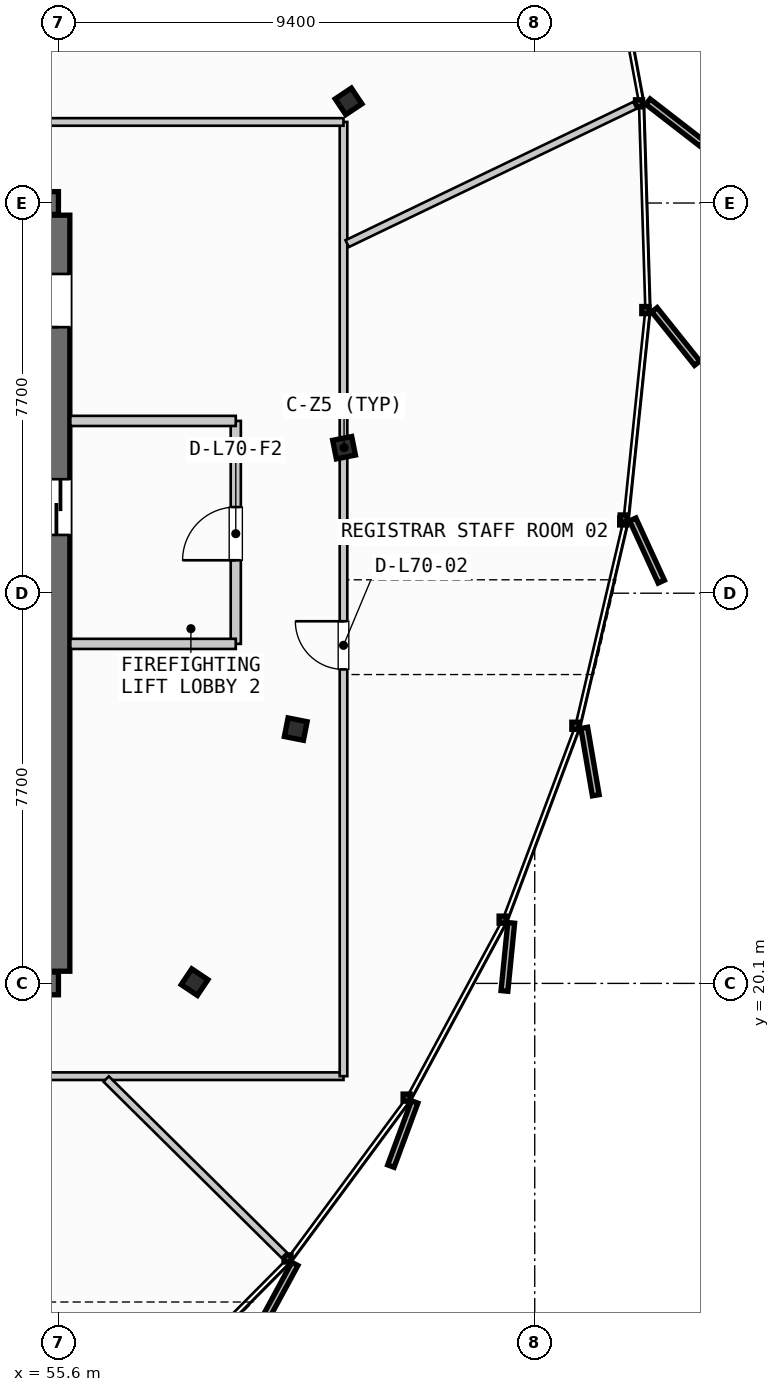
"""IFC4 building model, lengths in metres.
Left out: names, types, materials, properties, quantities, classifications, styles, units other than length and angle.
Written with IfcOpenShell. Run it as: python <this file> out.ifc"""

import sys

from ifc_helpers import new_model, si_unit, direction, frame, frame_2d, origin, origin_2d, place, context, subcontext, project, spatial, rectangle, i_section, extrude, source, transform, mapped, element, fill, save


model = new_model("IFC4")
c1 = context("Model", 3, precision=1e-05, world=origin(), true_north=direction((0.0, 1.0)))
c2 = subcontext(c1, "Body", "Model", "MODEL_VIEW")
j1 = project(units=[si_unit("LENGTHUNIT", "METRE"), si_unit("PLANEANGLEUNIT", "RADIAN")], contexts=[c1])
p1 = place(None, origin())
s1 = spatial("IfcSite", under=j1, at=p1, CompositionType="ELEMENT")
p2 = place(p1, origin())
s2 = spatial("IfcBuilding", under=s1, at=p2, CompositionType="ELEMENT")
p3 = place(p2, frame((0.0, 0.0, 266.35)))
s3 = spatial("IfcBuildingStorey", under=s2, at=p3, CompositionType="ELEMENT", Elevation=266.35)
p4 = place(p3, frame((38.0, 20.1, 0.0), z_axis=(0.0, 0.0, 1.0), x_axis=(1.0, 0.0, 0.0)))
e1 = element("IfcWall", 1, at=p4, inside=s3, PredefinedType="SHEAR", context=c2, shape_type="SweptSolid", body=[
    extrude(rectangle(XDim=17.6, YDim=0.45, at=frame_2d((8.8, 0.0))), origin(), (0.0, 0.0, 1.0), 3.21),
])
p5 = place(p4, frame((1.4, 0.0, 0.0)))
e2 = element("IfcOpeningElement", 2, at=p5, cuts=e1, PredefinedType="OPENING", context=c2, shape_type="SweptSolid", body=[
    extrude(rectangle(XDim=1.05, YDim=2.15, at=frame_2d((0.525, 1.075))), frame((0.0, 0.235, 0.0), z_axis=(0.0, -1.0, 0.0), x_axis=(1.0, 0.0, 0.0)), (0.0, 0.0, 1.0), 0.47),
])
p6 = place(p4, frame((15.15, 0.0, 0.0)))
e3 = element("IfcOpeningElement", 3, at=p6, cuts=e1, PredefinedType="OPENING", context=c2, shape_type="SweptSolid", body=[
    extrude(rectangle(XDim=1.05, YDim=2.15, at=frame_2d((0.525, 1.075))), frame((0.0, 0.235, 0.0), z_axis=(0.0, -1.0, 0.0), x_axis=(1.0, 0.0, 0.0)), (0.0, 0.0, 1.0), 0.47),
])
p7 = place(p4, frame((5.25, 0.0, 0.0)))
e4 = element("IfcOpeningElement", 4, at=p7, cuts=e1, PredefinedType="OPENING", context=c2, shape_type="SweptSolid", body=[
    extrude(rectangle(XDim=0.95, YDim=2.15, at=frame_2d((0.475, 1.075))), frame((0.0, 0.235, 0.0), z_axis=(0.0, -1.0, 0.0), x_axis=(1.0, 0.0, 0.0)), (0.0, 0.0, 1.0), 0.47),
])
p8 = place(p4, frame((11.4, 0.0, 0.0)))
e5 = element("IfcOpeningElement", 5, at=p8, cuts=e1, PredefinedType="OPENING", context=c2, shape_type="SweptSolid", body=[
    extrude(rectangle(XDim=0.95, YDim=2.15, at=frame_2d((0.475, 1.075))), frame((0.0, 0.235, 0.0), z_axis=(0.0, -1.0, 0.0), x_axis=(1.0, 0.0, 0.0)), (0.0, 0.0, 1.0), 0.47),
])
p9 = place(p3, frame((55.6, 35.5, 0.0), z_axis=(0.0, 0.0, 1.0), x_axis=(-1.0, 0.0, 0.0)))
e6 = element("IfcWall", 6, at=p9, inside=s3, PredefinedType="SHEAR", context=c2, shape_type="SweptSolid", body=[
    extrude(rectangle(XDim=17.6, YDim=0.45, at=frame_2d((8.8, 0.0))), origin(), (0.0, 0.0, 1.0), 3.21),
])
p10 = place(p9, frame((8.05, 0.0, 0.0)))
e7 = element("IfcOpeningElement", 7, at=p10, cuts=e6, PredefinedType="OPENING", context=c2, shape_type="SweptSolid", body=[
    extrude(rectangle(XDim=1.5, YDim=2.2, at=frame_2d((0.75, 1.1))), frame((0.0, 0.235, 0.0), z_axis=(0.0, -1.0, 0.0), x_axis=(1.0, 0.0, 0.0)), (0.0, 0.0, 1.0), 0.47),
])
p11 = place(p9, frame((15.1, 0.0, 0.0)))
e8 = element("IfcOpeningElement", 8, at=p11, cuts=e6, PredefinedType="OPENING", context=c2, shape_type="SweptSolid", body=[
    extrude(rectangle(XDim=0.95, YDim=2.15, at=frame_2d((0.475, 1.075))), frame((0.0, 0.235, 0.0), z_axis=(0.0, -1.0, 0.0), x_axis=(1.0, 0.0, 0.0)), (0.0, 0.0, 1.0), 0.47),
])
p12 = place(p9, frame((12.6, 0.0, 0.0)))
e9 = element("IfcOpeningElement", 9, at=p12, cuts=e6, PredefinedType="OPENING", context=c2, shape_type="SweptSolid", body=[
    extrude(rectangle(XDim=0.95, YDim=2.15, at=frame_2d((0.475, 1.075))), frame((0.0, 0.235, 0.0), z_axis=(0.0, -1.0, 0.0), x_axis=(1.0, 0.0, 0.0)), (0.0, 0.0, 1.0), 0.47),
])
p13 = place(p9, frame((10.45, 0.0, 0.0)))
e10 = element("IfcOpeningElement", 10, at=p13, cuts=e6, PredefinedType="OPENING", context=c2, shape_type="SweptSolid", body=[
    extrude(rectangle(XDim=0.95, YDim=2.15, at=frame_2d((0.475, 1.075))), frame((0.0, 0.235, 0.0), z_axis=(0.0, -1.0, 0.0), x_axis=(1.0, 0.0, 0.0)), (0.0, 0.0, 1.0), 0.47),
])
p14 = place(p3, frame((55.6, 20.34, 0.0), z_axis=(0.0, 0.0, 1.0), x_axis=(0.0, 1.0, 0.0)))
e11 = element("IfcWall", 11, at=p14, inside=s3, PredefinedType="SHEAR", context=c2, shape_type="SweptSolid", body=[
    extrude(rectangle(XDim=14.92, YDim=0.45, at=frame_2d((7.46, 0.0))), origin(), (0.0, 0.0, 1.0), 3.21),
])
p15 = place(p14, frame((12.71, 0.0, 0.0)))
e12 = element("IfcOpeningElement", 12, at=p15, cuts=e11, PredefinedType="OPENING", context=c2, shape_type="SweptSolid", body=[
    extrude(rectangle(XDim=1.05, YDim=2.15, at=frame_2d((0.525, 1.075))), frame((0.0, 0.235, 0.0), z_axis=(0.0, -1.0, 0.0), x_axis=(1.0, 0.0, 0.0)), (0.0, 0.0, 1.0), 0.47),
])
p16 = place(p14, frame((8.61, 0.0, 0.0)))
e13 = element("IfcOpeningElement", 13, at=p16, cuts=e11, PredefinedType="OPENING", context=c2, shape_type="SweptSolid", body=[
    extrude(rectangle(XDim=1.1, YDim=2.2, at=frame_2d((0.55, 1.1))), frame((0.0, 0.235, 0.0), z_axis=(0.0, -1.0, 0.0), x_axis=(1.0, 0.0, 0.0)), (0.0, 0.0, 1.0), 0.47),
])
m1 = source(origin(), c2, "Body", "SweptSolid", [
    extrude(i_section(OverallWidth=0.374, OverallDepth=0.383, WebThickness=0.017, FlangeThickness=0.026, FilletRadius=0.015, at=origin_2d()), origin(), (0.0, 0.0, 1.0), 3.21),
])
for number, where, z_axis, x_axis in (
    (14, (61.237, 30.672, 0.0), (0.0, 0.0, 1.0), (0.981, 0.195, 0.0)),
    (15, (61.326, 37.506, 0.0), (0.0, 0.0, 1.0), (0.831, 0.556, 0.0)),
    (16, (58.287, 20.125, 0.0), (0.0, 0.0, 1.0), (0.831, -0.556, 0.0)),
    (17, (60.284, 25.118, 0.0), (0.0, 0.0, 1.0), (0.981, -0.195, 0.0)),
):
    element("IfcColumn", number, at=place(p3, frame(where, z_axis=z_axis, x_axis=x_axis)), inside=s3, PredefinedType="COLUMN", context=c2, shape_type="MappedRepresentation", body=[
        mapped(m1, transform((0.0, 0.0, 0.0), scale=1.0)),
    ])
p17 = place(p3, frame((59.1, 26.8, 0.0), z_axis=(0.0, 0.0, 1.0), x_axis=(0.0, 1.0, 0.0)))
e18 = element("IfcWall", 18, at=p17, inside=s3, PredefinedType="PARTITIONING", context=c2, shape_type="SweptSolid", body=[
    extrude(rectangle(XDim=4.4, YDim=0.2, at=frame_2d((2.2, 0.0))), origin(), (0.0, 0.0, 1.0), 2.595),
])
p18 = place(p17, frame((1.65, 0.0, 0.0)))
e19 = element("IfcOpeningElement", 19, at=p18, cuts=e18, PredefinedType="OPENING", context=c2, shape_type="SweptSolid", body=[
    extrude(rectangle(XDim=1.05, YDim=2.15, at=frame_2d((0.525, 1.075))), frame((0.0, 0.11, 0.0), z_axis=(0.0, -1.0, 0.0), x_axis=(1.0, 0.0, 0.0)), (0.0, 0.0, 1.0), 0.22),
])
for number, where, z_axis, x_axis in (
    (20, (55.835, 26.8, 0.0), (0.0, 0.0, 1.0), (1.0, 0.0, 0.0)),
    (21, (55.835, 31.2, 0.0), (0.0, 0.0, 1.0), (1.0, 0.0, 0.0)),
):
    element("IfcWall", number, at=place(p3, frame(where, z_axis=z_axis, x_axis=x_axis)), inside=s3, PredefinedType="PARTITIONING", context=c2, shape_type="SweptSolid", body=[
        extrude(rectangle(XDim=3.265, YDim=0.2, at=frame_2d((1.633, 0.0))), origin(), (0.0, 0.0, 1.0), 2.595),
    ])
p19 = place(p3, frame((32.07, 18.269, 0.0), z_axis=(0.0, 0.0, 1.0), x_axis=(1.0, 0.0, 0.0)))
e22 = element("IfcWall", 22, at=p19, inside=s3, PredefinedType="PARTITIONING", context=c2, shape_type="SweptSolid", body=[
    extrude(rectangle(XDim=29.156, YDim=0.15, at=frame_2d((14.578, 0.0))), origin(), (0.0, 0.0, 1.0), 2.595),
])
p20 = place(p19, frame((13.599, 0.0, 0.0)))
e23 = element("IfcOpeningElement", 23, at=p20, cuts=e22, PredefinedType="OPENING", context=c2, shape_type="SweptSolid", body=[
    extrude(rectangle(XDim=0.95, YDim=2.15, at=frame_2d((0.475, 1.075))), frame((0.0, 0.085, 0.0), z_axis=(0.0, -1.0, 0.0), x_axis=(1.0, 0.0, 0.0)), (0.0, 0.0, 1.0), 0.17),
])
p21 = place(p3, frame((61.226, 18.269, 0.0), z_axis=(0.0, 0.0, 1.0), x_axis=(0.0, 1.0, 0.0)))
e24 = element("IfcWall", 24, at=p21, inside=s3, PredefinedType="PARTITIONING", context=c2, shape_type="SweptSolid", body=[
    extrude(rectangle(XDim=18.831, YDim=0.15, at=frame_2d((9.416, 0.0))), origin(), (0.0, 0.0, 1.0), 2.595),
])
p22 = place(p21, frame((8.028, 0.0, 0.0)))
e25 = element("IfcOpeningElement", 25, at=p22, cuts=e24, PredefinedType="OPENING", context=c2, shape_type="SweptSolid", body=[
    extrude(rectangle(XDim=0.95, YDim=2.15, at=frame_2d((0.475, 1.075))), frame((0.0, 0.085, 0.0), z_axis=(0.0, -1.0, 0.0), x_axis=(1.0, 0.0, 0.0)), (0.0, 0.0, 1.0), 0.17),
])
p23 = place(p3, frame((61.226, 37.1, 0.0), z_axis=(0.0, 0.0, 1.0), x_axis=(-1.0, 0.0, 0.0)))
e26 = element("IfcWall", 26, at=p23, inside=s3, PredefinedType="PARTITIONING", context=c2, shape_type="SweptSolid", body=[
    extrude(rectangle(XDim=29.156, YDim=0.15, at=frame_2d((14.578, 0.0))), origin(), (0.0, 0.0, 1.0), 2.595),
])
p24 = place(p23, frame((14.103, 0.0, 0.0)))
e27 = element("IfcOpeningElement", 27, at=p24, cuts=e26, PredefinedType="OPENING", context=c2, shape_type="SweptSolid", body=[
    extrude(rectangle(XDim=0.95, YDim=2.15, at=frame_2d((0.475, 1.075))), frame((0.0, 0.085, 0.0), z_axis=(0.0, -1.0, 0.0), x_axis=(1.0, 0.0, 0.0)), (0.0, 0.0, 1.0), 0.17),
])
p25 = place(p3, frame((56.542, 18.213, 0.0), z_axis=(0.0, 0.0, 1.0), x_axis=(0.710873734805, -0.703319652195, 0.0)))
e28 = element("IfcWall", 28, at=p25, inside=s3, PredefinedType="PARTITIONING", context=c2, shape_type="SweptSolid", body=[
    extrude(rectangle(XDim=4.945, YDim=0.15, at=frame_2d((2.472, 0.0))), origin(), (0.0, 0.0, 1.0), 2.595),
])
p26 = place(p3, frame((61.298, 34.698, 0.0), z_axis=(0.0, 0.0, 1.0), x_axis=(0.901269589743, 0.433258729403, 0.0)))
e29 = element("IfcWall", 29, at=p26, inside=s3, PredefinedType="PARTITIONING", context=c2, shape_type="SweptSolid", body=[
    extrude(rectangle(XDim=6.302, YDim=0.15, at=frame_2d((3.151, 0.0))), origin(), (0.0, 0.0, 1.0), 2.595),
])
m2 = source(origin(), c2, "Body", "SweptSolid", [
    extrude(rectangle(XDim=1.05, YDim=2.15, at=frame_2d((0.525, 1.075))), frame((0.0, 0.025, 0.0), z_axis=(0.0, -1.0, 0.0), x_axis=(1.0, 0.0, 0.0)), (0.0, 0.0, 1.0), 0.05),
])
p27 = place(p15, origin())
e30 = element("IfcDoor", 30, at=p27, inside=s3, OperationType="SINGLE_SWING_LEFT", PredefinedType="DOOR", context=c2, shape_type="MappedRepresentation", body=[
    mapped(m2, transform((0.0, 0.0, 0.0), scale=1.0)),
])
fill(e12, e30)
m3 = source(origin(), c2, "Body", "SweptSolid", [
    extrude(rectangle(XDim=1.1, YDim=2.2, at=frame_2d((0.55, 1.1))), frame((0.0, 0.025, 0.0), z_axis=(0.0, -1.0, 0.0), x_axis=(1.0, 0.0, 0.0)), (0.0, 0.0, 1.0), 0.05),
])
p28 = place(p16, origin())
e31 = element("IfcDoor", 31, at=p28, inside=s3, OperationType="SLIDING_TO_RIGHT", PredefinedType="DOOR", context=c2, shape_type="MappedRepresentation", body=[
    mapped(m3, transform((0.0, 0.0, 0.0), scale=1.0)),
])
fill(e13, e31)
p29 = place(p18, origin())
e32 = element("IfcDoor", 32, at=p29, inside=s3, OperationType="SINGLE_SWING_LEFT", PredefinedType="DOOR", context=c2, shape_type="MappedRepresentation", body=[
    mapped(m2, transform((0.0, 0.0, 0.0), scale=1.0)),
])
fill(e19, e32)
m4 = source(origin(), c2, "Body", "SweptSolid", [
    extrude(rectangle(XDim=0.95, YDim=2.15, at=frame_2d((0.475, 1.075))), frame((0.0, 0.025, 0.0), z_axis=(0.0, -1.0, 0.0), x_axis=(1.0, 0.0, 0.0)), (0.0, 0.0, 1.0), 0.05),
])
p30 = place(p22, origin())
e33 = element("IfcDoor", 33, at=p30, inside=s3, OperationType="SINGLE_SWING_RIGHT", PredefinedType="DOOR", context=c2, shape_type="MappedRepresentation", body=[
    mapped(m4, transform((0.0, 0.0, 0.0), scale=1.0)),
])
fill(e25, e33)
save(model, sys.argv[1])
